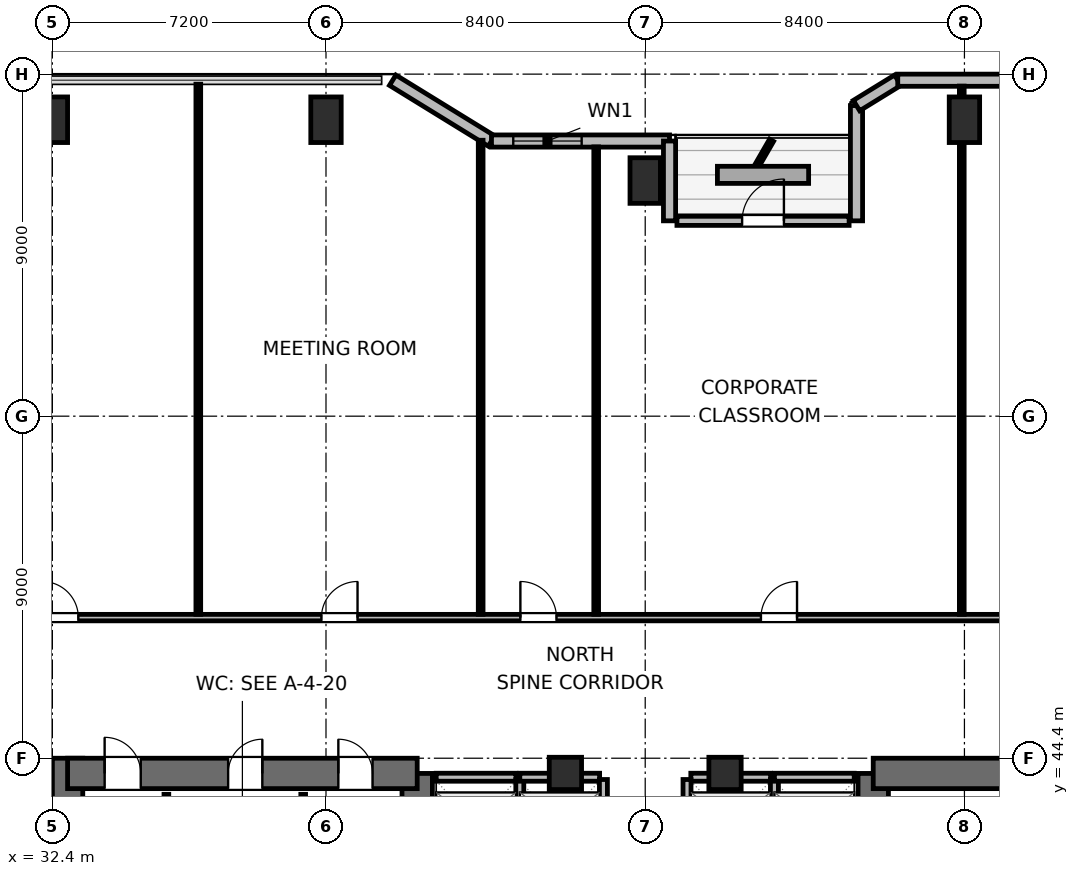
"""IFC4 building model, lengths in metres.
Left out: names, types, materials, properties, quantities, classifications, styles, units other than length and angle.
Written with IfcOpenShell. Run it as: python <this file> out.ifc"""

import sys

from ifc_helpers import new_model, si_unit, direction, frame, frame_2d, origin, origin_2d, place, context, subcontext, project, spatial, rectangle, extrude, element, fill, save


model = new_model("IFC4")
c1 = context("Model", 3, precision=1e-05, world=origin(), true_north=direction((0.0, 1.0)))
c2 = subcontext(c1, "Body", "Model", "MODEL_VIEW")
j1 = project(units=[si_unit("LENGTHUNIT", "METRE"), si_unit("PLANEANGLEUNIT", "RADIAN")], contexts=[c1])
p1 = place(None, origin())
s1 = spatial("IfcSite", under=j1, at=p1, CompositionType="ELEMENT")
p2 = place(p1, origin())
s2 = spatial("IfcBuilding", under=s1, at=p2, CompositionType="ELEMENT")
p3 = place(p2, frame((0.0, 0.0, 125.4)))
s3 = spatial("IfcBuildingStorey", under=s2, at=p3, CompositionType="ELEMENT", Elevation=125.4)
p4 = place(p3, frame((32.8, 27.6, 0.0), z_axis=(0.0, 0.0, 1.0), x_axis=(0.0, 1.0, 0.0)))
e1 = element("IfcWall", 1, at=p4, inside=s3, PredefinedType="SHEAR", context=c2, shape_type="SweptSolid", body=[
    extrude(rectangle(XDim=16.8, YDim=0.8, at=frame_2d((8.4, 0.0))), origin(), (0.0, 0.0, 1.0), 4.5),
])
p5 = place(p3, frame((42.0, 37.8, 0.0), z_axis=(0.0, 0.0, 1.0), x_axis=(0.0, 1.0, 0.0)))
e2 = element("IfcWall", 2, at=p5, inside=s3, PredefinedType="SHEAR", context=c2, shape_type="SweptSolid", body=[
    extrude(rectangle(XDim=6.2, YDim=0.8, at=frame_2d((3.1, 0.0))), origin(), (0.0, 0.0, 1.0), 4.5),
])
p6 = place(p3, frame((32.8, 44.0, 0.0), z_axis=(0.0, 0.0, 1.0), x_axis=(1.0, 0.0, 0.0)))
e3 = element("IfcWall", 3, at=p6, inside=s3, PredefinedType="SHEAR", context=c2, shape_type="SweptSolid", body=[
    extrude(rectangle(XDim=9.2, YDim=0.8, at=frame_2d((4.6, 0.0))), origin(), (0.0, 0.0, 1.0), 4.5),
])
p7 = place(p6, frame((0.975, 0.0, 0.0)))
e4 = element("IfcOpeningElement", 4, at=p7, cuts=e3, PredefinedType="OPENING", context=c2, shape_type="SweptSolid", body=[
    extrude(rectangle(XDim=0.95, YDim=2.04, at=frame_2d((0.475, 1.02))), frame((0.0, 0.41, 0.0), z_axis=(0.0, -1.0, 0.0), x_axis=(1.0, 0.0, 0.0)), (0.0, 0.0, 1.0), 0.82),
])
p8 = place(p6, frame((4.225, 0.0, 0.0)))
e5 = element("IfcOpeningElement", 5, at=p8, cuts=e3, PredefinedType="OPENING", context=c2, shape_type="SweptSolid", body=[
    extrude(rectangle(XDim=0.9, YDim=2.02, at=frame_2d((0.45, 1.01))), frame((0.0, 0.41, 0.0), z_axis=(0.0, -1.0, 0.0), x_axis=(1.0, 0.0, 0.0)), (0.0, 0.0, 1.0), 0.82),
])
p9 = place(p6, frame((7.125, 0.0, 0.0)))
e6 = element("IfcOpeningElement", 6, at=p9, cuts=e3, PredefinedType="OPENING", context=c2, shape_type="SweptSolid", body=[
    extrude(rectangle(XDim=0.9, YDim=2.02, at=frame_2d((0.45, 1.01))), frame((0.0, 0.41, 0.0), z_axis=(0.0, -1.0, 0.0), x_axis=(1.0, 0.0, 0.0)), (0.0, 0.0, 1.0), 0.82),
])
p10 = place(p3, frame((54.0, 38.0, 0.0), z_axis=(0.0, 0.0, 1.0), x_axis=(0.0, 1.0, 0.0)))
e7 = element("IfcWall", 7, at=p10, inside=s3, PredefinedType="SHEAR", context=c2, shape_type="SweptSolid", body=[
    extrude(rectangle(XDim=6.0, YDim=0.8, at=frame_2d((3.0, 0.0))), origin(), (0.0, 0.0, 1.0), 4.5),
])
p11 = place(p3, frame((54.0, 44.0, 0.0), z_axis=(0.0, 0.0, 1.0), x_axis=(1.0, 0.0, 0.0)))
e8 = element("IfcWall", 8, at=p11, inside=s3, PredefinedType="SHEAR", context=c2, shape_type="SweptSolid", body=[
    extrude(rectangle(XDim=9.2, YDim=0.8, at=frame_2d((4.6, 0.0))), origin(), (0.0, 0.0, 1.0), 4.5),
])
for number, where, z_axis, x_axis in (
    (9, (32.4, 61.2, 0.0), (0.0, 0.0, 1.0), (1.0, 0.0, 0.0)),
    (10, (39.6, 61.2, 0.0), (0.0, 0.0, 1.0), (1.0, 0.0, 0.0)),
    (11, (48.0, 59.6, 0.0), (0.0, 0.0, 1.0), (1.0, 0.0, 0.0)),
    (12, (56.4, 61.2, 0.0), (0.0, 0.0, 1.0), (1.0, 0.0, 0.0)),
):
    element("IfcColumn", number, at=place(p3, frame(where, z_axis=z_axis, x_axis=x_axis)), inside=s3, PredefinedType="COLUMN", context=c2, shape_type="SweptSolid", body=[
        extrude(rectangle(XDim=0.8, YDim=1.2, at=origin_2d()), origin(), (0.0, 0.0, 1.0), 4.5),
    ])
for number, where, z_axis, x_axis in (
    (13, (45.9, 44.0, 0.0), (0.0, 0.0, 1.0), (1.0, 0.0, 0.0)),
    (14, (50.1, 44.0, 0.0), (0.0, 0.0, 1.0), (1.0, 0.0, 0.0)),
):
    element("IfcColumn", number, at=place(p3, frame(where, z_axis=z_axis, x_axis=x_axis)), inside=s3, PredefinedType="COLUMN", context=c2, shape_type="SweptSolid", body=[
        extrude(rectangle(XDim=0.85, YDim=0.85, at=origin_2d()), origin(), (0.0, 0.0, 1.0), 4.5),
    ])
p12 = place(p3, frame((41.355, 62.24, 0.0), z_axis=(0.0, 0.0, 1.0), x_axis=(0.851630857047, -0.524142044989, 0.0)))
e15 = element("IfcWall", 15, at=p12, inside=s3, PredefinedType="SOLIDWALL", context=c2, shape_type="SweptSolid", body=[
    extrude(rectangle(XDim=3.053, YDim=0.32, at=frame_2d((1.526, 0.0))), origin(), (0.0, 0.0, 1.0), 3.475),
])
p13 = place(p3, frame((43.955, 60.64, 0.0), z_axis=(0.0, 0.0, 1.0), x_axis=(1.0, 0.0, 0.0)))
e16 = element("IfcWall", 16, at=p13, inside=s3, PredefinedType="SOLIDWALL", context=c2, shape_type="SweptSolid", body=[
    extrude(rectangle(XDim=4.685, YDim=0.32, at=frame_2d((2.343, 0.0))), origin(), (0.0, 0.0, 1.0), 3.475),
])
p14 = place(p13, frame((0.573, 0.0, 0.85)))
e17 = element("IfcOpeningElement", 17, at=p14, cuts=e16, PredefinedType="OPENING", context=c2, shape_type="SweptSolid", body=[
    extrude(rectangle(XDim=1.8, YDim=1.1, at=frame_2d((0.9, 0.55))), frame((0.0, 0.17, 0.0), z_axis=(0.0, -1.0, 0.0), x_axis=(1.0, 0.0, 0.0)), (0.0, 0.0, 1.0), 0.34),
])
p15 = place(p3, frame((48.64, 60.64, 0.0), z_axis=(0.0, 0.0, 1.0), x_axis=(0.0, -1.0, 0.0)))
e18 = element("IfcWall", 18, at=p15, inside=s3, PredefinedType="SOLIDWALL", context=c2, shape_type="SweptSolid", body=[
    extrude(rectangle(XDim=2.1, YDim=0.32, at=frame_2d((1.05, 0.0))), origin(), (0.0, 0.0, 1.0), 3.475),
])
p16 = place(p3, frame((48.835, 58.54, 0.0), z_axis=(0.0, 0.0, 1.0), x_axis=(1.0, 0.0, 0.0)))
e19 = element("IfcWall", 19, at=p16, inside=s3, PredefinedType="SOLIDWALL", context=c2, shape_type="SweptSolid", body=[
    extrude(rectangle(XDim=4.53, YDim=0.24, at=frame_2d((2.265, 0.0))), origin(), (0.0, 0.0, 1.0), 4.24),
])
p17 = place(p16, frame((1.715, 0.0, 0.0)))
e20 = element("IfcOpeningElement", 20, at=p17, cuts=e19, PredefinedType="OPENING", context=c2, shape_type="SweptSolid", body=[
    extrude(rectangle(XDim=1.1, YDim=2.04, at=frame_2d((0.55, 1.02))), frame((0.0, 0.13, 0.0), z_axis=(0.0, -1.0, 0.0), x_axis=(1.0, 0.0, 0.0)), (0.0, 0.0, 1.0), 0.26),
])
p18 = place(p3, frame((53.56, 58.54, 0.0), z_axis=(0.0, 0.0, 1.0), x_axis=(0.0, 1.0, 0.0)))
e21 = element("IfcWall", 21, at=p18, inside=s3, PredefinedType="SOLIDWALL", context=c2, shape_type="SweptSolid", body=[
    extrude(rectangle(XDim=3.032, YDim=0.32, at=frame_2d((1.516, 0.0))), origin(), (0.0, 0.0, 1.0), 3.475),
])
p19 = place(p3, frame((53.56, 61.573, 0.0), z_axis=(0.0, 0.0, 1.0), x_axis=(0.851776724646, 0.523904964045, 0.0)))
e22 = element("IfcWall", 22, at=p19, inside=s3, PredefinedType="SOLIDWALL", context=c2, shape_type="SweptSolid", body=[
    extrude(rectangle(XDim=1.274, YDim=0.32, at=frame_2d((0.637, 0.0))), origin(), (0.0, 0.0, 1.0), 4.24),
])
p20 = place(p3, frame((54.645, 62.24, 0.0), z_axis=(0.0, 0.0, 1.0), x_axis=(1.0, 0.0, 0.0)))
e23 = element("IfcWall", 23, at=p20, inside=s3, PredefinedType="SOLIDWALL", context=c2, shape_type="SweptSolid", body=[
    extrude(rectangle(XDim=10.734, YDim=0.32, at=frame_2d((5.367, 0.0))), origin(), (0.0, 0.0, 1.0), 4.24),
])
for number, where, z_axis, x_axis in (
    (24, (35.4, 41.095, 0.0), (0.0, 0.0, 1.0), (0.0, 1.0, 0.0)),
    (25, (39.0, 41.095, 0.0), (0.0, 0.0, 1.0), (0.0, 1.0, 0.0)),
):
    element("IfcWall", number, at=place(p3, frame(where, z_axis=z_axis, x_axis=x_axis)), inside=s3, PredefinedType="PARTITIONING", context=c2, shape_type="SweptSolid", body=[
        extrude(rectangle(XDim=2.355, YDim=0.125, at=frame_2d((1.177, 0.0))), origin(), (0.0, 0.0, 1.0), 4.24),
    ])
p21 = place(p3, frame((42.5, 43.9, 0.0), z_axis=(0.0, 0.0, 1.0), x_axis=(1.0, 0.0, 0.0)))
e26 = element("IfcWall", 26, at=p21, inside=s3, PredefinedType="PARTITIONING", context=c2, shape_type="SweptSolid", body=[
    extrude(rectangle(XDim=2.1, YDim=0.21, at=frame_2d((1.05, 0.0))), origin(), (0.0, 0.0, 1.0), 3.125),
])
p22 = place(p3, frame((44.7, 41.56, 0.0), z_axis=(0.0, 0.0, 1.0), x_axis=(0.0, 1.0, 0.0)))
e27 = element("IfcWall", 27, at=p22, inside=s3, PredefinedType="PARTITIONING", context=c2, shape_type="SweptSolid", body=[
    extrude(rectangle(XDim=2.28, YDim=0.21, at=frame_2d((1.14, 0.0))), origin(), (0.0, 0.0, 1.0), 4.24),
])
p23 = place(p3, frame((44.7, 43.9, 0.0), z_axis=(0.0, 0.0, 1.0), x_axis=(1.0, 0.0, 0.0)))
e28 = element("IfcWall", 28, at=p23, inside=s3, PredefinedType="PARTITIONING", context=c2, shape_type="SweptSolid", body=[
    extrude(rectangle(XDim=2.1, YDim=0.21, at=frame_2d((1.05, 0.0))), origin(), (0.0, 0.0, 1.0), 3.125),
])
p24 = place(p3, frame((46.9, 41.56, 0.0), z_axis=(0.0, 0.0, 1.0), x_axis=(0.0, 1.0, 0.0)))
e29 = element("IfcWall", 29, at=p24, inside=s3, PredefinedType="PARTITIONING", context=c2, shape_type="SweptSolid", body=[
    extrude(rectangle(XDim=2.28, YDim=0.21, at=frame_2d((1.14, 0.0))), origin(), (0.0, 0.0, 1.0), 4.24),
])
p25 = place(p3, frame((49.2, 43.9, 0.0), z_axis=(0.0, 0.0, 1.0), x_axis=(1.0, 0.0, 0.0)))
e30 = element("IfcWall", 30, at=p25, inside=s3, PredefinedType="PARTITIONING", context=c2, shape_type="SweptSolid", body=[
    extrude(rectangle(XDim=2.1, YDim=0.21, at=frame_2d((1.05, 0.0))), origin(), (0.0, 0.0, 1.0), 3.125),
])
for number, where, z_axis, x_axis in (
    (31, (49.1, 41.56, 0.0), (0.0, 0.0, 1.0), (0.0, 1.0, 0.0)),
    (32, (51.4, 41.56, 0.0), (0.0, 0.0, 1.0), (0.0, 1.0, 0.0)),
):
    element("IfcWall", number, at=place(p3, frame(where, z_axis=z_axis, x_axis=x_axis)), inside=s3, PredefinedType="PARTITIONING", context=c2, shape_type="SweptSolid", body=[
        extrude(rectangle(XDim=2.28, YDim=0.21, at=frame_2d((1.14, 0.0))), origin(), (0.0, 0.0, 1.0), 4.24),
    ])
p26 = place(p3, frame((51.4, 43.9, 0.0), z_axis=(0.0, 0.0, 1.0), x_axis=(1.0, 0.0, 0.0)))
e33 = element("IfcWall", 33, at=p26, inside=s3, PredefinedType="PARTITIONING", context=c2, shape_type="SweptSolid", body=[
    extrude(rectangle(XDim=2.1, YDim=0.21, at=frame_2d((1.05, 0.0))), origin(), (0.0, 0.0, 1.0), 3.125),
])
p27 = place(p3, frame((28.975, 48.1, 0.0), z_axis=(0.0, 0.0, 1.0), x_axis=(1.0, 0.0, 0.0)))
e34 = element("IfcWall", 34, at=p27, inside=s3, PredefinedType="PARTITIONING", context=c2, shape_type="SweptSolid", body=[
    extrude(rectangle(XDim=34.625, YDim=0.17, at=frame_2d((17.312, 0.0))), origin(), (0.0, 0.0, 1.0), 4.24),
])
p28 = place(p27, frame((3.158, 0.0, 0.0)))
e35 = element("IfcOpeningElement", 35, at=p28, cuts=e34, PredefinedType="OPENING", context=c2, shape_type="SweptSolid", body=[
    extrude(rectangle(XDim=0.95, YDim=2.04, at=frame_2d((0.475, 1.02))), frame((0.0, 0.095, 0.0), z_axis=(0.0, -1.0, 0.0), x_axis=(1.0, 0.0, 0.0)), (0.0, 0.0, 1.0), 0.19),
])
p29 = place(p27, frame((10.505, 0.0, 0.0)))
e36 = element("IfcOpeningElement", 36, at=p29, cuts=e34, PredefinedType="OPENING", context=c2, shape_type="SweptSolid", body=[
    extrude(rectangle(XDim=0.95, YDim=2.04, at=frame_2d((0.475, 1.02))), frame((0.0, 0.095, 0.0), z_axis=(0.0, -1.0, 0.0), x_axis=(1.0, 0.0, 0.0)), (0.0, 0.0, 1.0), 0.19),
])
p30 = place(p27, frame((15.74, 0.0, 0.0)))
e37 = element("IfcOpeningElement", 37, at=p30, cuts=e34, PredefinedType="OPENING", context=c2, shape_type="SweptSolid", body=[
    extrude(rectangle(XDim=0.95, YDim=2.04, at=frame_2d((0.475, 1.02))), frame((0.0, 0.095, 0.0), z_axis=(0.0, -1.0, 0.0), x_axis=(1.0, 0.0, 0.0)), (0.0, 0.0, 1.0), 0.19),
])
p31 = place(p27, frame((22.07, 0.0, 0.0)))
e38 = element("IfcOpeningElement", 38, at=p31, cuts=e34, PredefinedType="OPENING", context=c2, shape_type="SweptSolid", body=[
    extrude(rectangle(XDim=0.95, YDim=2.04, at=frame_2d((0.475, 1.02))), frame((0.0, 0.095, 0.0), z_axis=(0.0, -1.0, 0.0), x_axis=(1.0, 0.0, 0.0)), (0.0, 0.0, 1.0), 0.19),
])
p32 = place(p27, frame((30.515, 0.0, 0.0)))
e39 = element("IfcOpeningElement", 39, at=p32, cuts=e34, PredefinedType="OPENING", context=c2, shape_type="SweptSolid", body=[
    extrude(rectangle(XDim=0.95, YDim=2.04, at=frame_2d((0.475, 1.02))), frame((0.0, 0.095, 0.0), z_axis=(0.0, -1.0, 0.0), x_axis=(1.0, 0.0, 0.0)), (0.0, 0.0, 1.0), 0.19),
])
p33 = place(p3, frame((36.24, 48.187, 0.0), z_axis=(0.0, 0.0, 1.0), x_axis=(0.0, 1.0, 0.0)))
e40 = element("IfcWall", 40, at=p33, inside=s3, PredefinedType="PARTITIONING", context=c2, shape_type="SweptSolid", body=[
    extrude(rectangle(XDim=13.948, YDim=0.125, at=frame_2d((6.974, 0.0))), origin(), (0.0, 0.0, 1.0), 4.24),
])
p34 = place(p3, frame((43.67, 48.187, 0.0), z_axis=(0.0, 0.0, 1.0), x_axis=(0.0, 1.0, 0.0)))
e41 = element("IfcWall", 41, at=p34, inside=s3, PredefinedType="PARTITIONING", context=c2, shape_type="SweptSolid", body=[
    extrude(rectangle(XDim=12.473, YDim=0.125, at=frame_2d((6.236, 0.0))), origin(), (0.0, 0.0, 1.0), 3.603),
])
p35 = place(p3, frame((46.71, 48.187, 0.0), z_axis=(0.0, 0.0, 1.0), x_axis=(0.0, 1.0, 0.0)))
e42 = element("IfcWall", 42, at=p35, inside=s3, PredefinedType="PARTITIONING", context=c2, shape_type="SweptSolid", body=[
    extrude(rectangle(XDim=12.298, YDim=0.125, at=frame_2d((6.149, 0.0))), origin(), (0.0, 0.0, 1.0), 4.24),
])
p36 = place(p3, frame((56.33, 48.187, 0.0), z_axis=(0.0, 0.0, 1.0), x_axis=(0.0, 1.0, 0.0)))
e43 = element("IfcWall", 43, at=p36, inside=s3, PredefinedType="PARTITIONING", context=c2, shape_type="SweptSolid", body=[
    extrude(rectangle(XDim=13.898, YDim=0.125, at=frame_2d((6.949, 0.0))), origin(), (0.0, 0.0, 1.0), 3.603),
])
p37 = place(p14, origin())
e44 = element("IfcWindow", 44, at=p37, inside=s3, PartitioningType="SINGLE_PANEL", PredefinedType="WINDOW", context=c2, shape_type="SweptSolid", body=[
    extrude(rectangle(XDim=1.8, YDim=1.1, at=frame_2d((0.9, 0.55))), frame((0.0, 0.03, 0.0), z_axis=(0.0, -1.0, 0.0), x_axis=(1.0, 0.0, 0.0)), (0.0, 0.0, 1.0), 0.06),
])
fill(e17, e44)
p38 = place(p17, origin())
e45 = element("IfcDoor", 45, at=p38, inside=s3, OperationType="SINGLE_SWING_RIGHT", PredefinedType="DOOR", context=c2, shape_type="SweptSolid", body=[
    extrude(rectangle(XDim=1.1, YDim=2.04, at=frame_2d((0.55, 1.02))), frame((0.0, 0.025, 0.0), z_axis=(0.0, -1.0, 0.0), x_axis=(1.0, 0.0, 0.0)), (0.0, 0.0, 1.0), 0.05),
])
fill(e20, e45)
p39 = place(p7, origin())
e46 = element("IfcDoor", 46, at=p39, inside=s3, OperationType="SINGLE_SWING_LEFT", PredefinedType="DOOR", context=c2, shape_type="SweptSolid", body=[
    extrude(rectangle(XDim=0.95, YDim=2.04, at=frame_2d((0.475, 1.02))), frame((0.0, 0.025, 0.0), z_axis=(0.0, -1.0, 0.0), x_axis=(1.0, 0.0, 0.0)), (0.0, 0.0, 1.0), 0.05),
])
fill(e4, e46)
p40 = place(p8, origin())
e47 = element("IfcDoor", 47, at=p40, inside=s3, OperationType="SINGLE_SWING_RIGHT", PredefinedType="DOOR", context=c2, shape_type="SweptSolid", body=[
    extrude(rectangle(XDim=0.9, YDim=2.02, at=frame_2d((0.45, 1.01))), frame((0.0, 0.025, 0.0), z_axis=(0.0, -1.0, 0.0), x_axis=(1.0, 0.0, 0.0)), (0.0, 0.0, 1.0), 0.05),
])
fill(e5, e47)
p41 = place(p9, origin())
e48 = element("IfcDoor", 48, at=p41, inside=s3, OperationType="SINGLE_SWING_LEFT", PredefinedType="DOOR", context=c2, shape_type="SweptSolid", body=[
    extrude(rectangle(XDim=0.9, YDim=2.02, at=frame_2d((0.45, 1.01))), frame((0.0, 0.025, 0.0), z_axis=(0.0, -1.0, 0.0), x_axis=(1.0, 0.0, 0.0)), (0.0, 0.0, 1.0), 0.05),
])
fill(e6, e48)
p42 = place(p28, origin())
e49 = element("IfcDoor", 49, at=p42, inside=s3, OperationType="SINGLE_SWING_LEFT", PredefinedType="DOOR", context=c2, shape_type="SweptSolid", body=[
    extrude(rectangle(XDim=0.95, YDim=2.04, at=frame_2d((0.475, 1.02))), frame((0.0, 0.025, 0.0), z_axis=(0.0, -1.0, 0.0), x_axis=(1.0, 0.0, 0.0)), (0.0, 0.0, 1.0), 0.05),
])
fill(e35, e49)
p43 = place(p29, origin())
e50 = element("IfcDoor", 50, at=p43, inside=s3, OperationType="SINGLE_SWING_RIGHT", PredefinedType="DOOR", context=c2, shape_type="SweptSolid", body=[
    extrude(rectangle(XDim=0.95, YDim=2.04, at=frame_2d((0.475, 1.02))), frame((0.0, 0.025, 0.0), z_axis=(0.0, -1.0, 0.0), x_axis=(1.0, 0.0, 0.0)), (0.0, 0.0, 1.0), 0.05),
])
fill(e36, e50)
p44 = place(p30, origin())
e51 = element("IfcDoor", 51, at=p44, inside=s3, OperationType="SINGLE_SWING_LEFT", PredefinedType="DOOR", context=c2, shape_type="SweptSolid", body=[
    extrude(rectangle(XDim=0.95, YDim=2.04, at=frame_2d((0.475, 1.02))), frame((0.0, 0.025, 0.0), z_axis=(0.0, -1.0, 0.0), x_axis=(1.0, 0.0, 0.0)), (0.0, 0.0, 1.0), 0.05),
])
fill(e37, e51)
p45 = place(p31, origin())
e52 = element("IfcDoor", 52, at=p45, inside=s3, OperationType="SINGLE_SWING_RIGHT", PredefinedType="DOOR", context=c2, shape_type="SweptSolid", body=[
    extrude(rectangle(XDim=0.95, YDim=2.04, at=frame_2d((0.475, 1.02))), frame((0.0, 0.025, 0.0), z_axis=(0.0, -1.0, 0.0), x_axis=(1.0, 0.0, 0.0)), (0.0, 0.0, 1.0), 0.05),
])
fill(e38, e52)
save(model, sys.argv[1])
